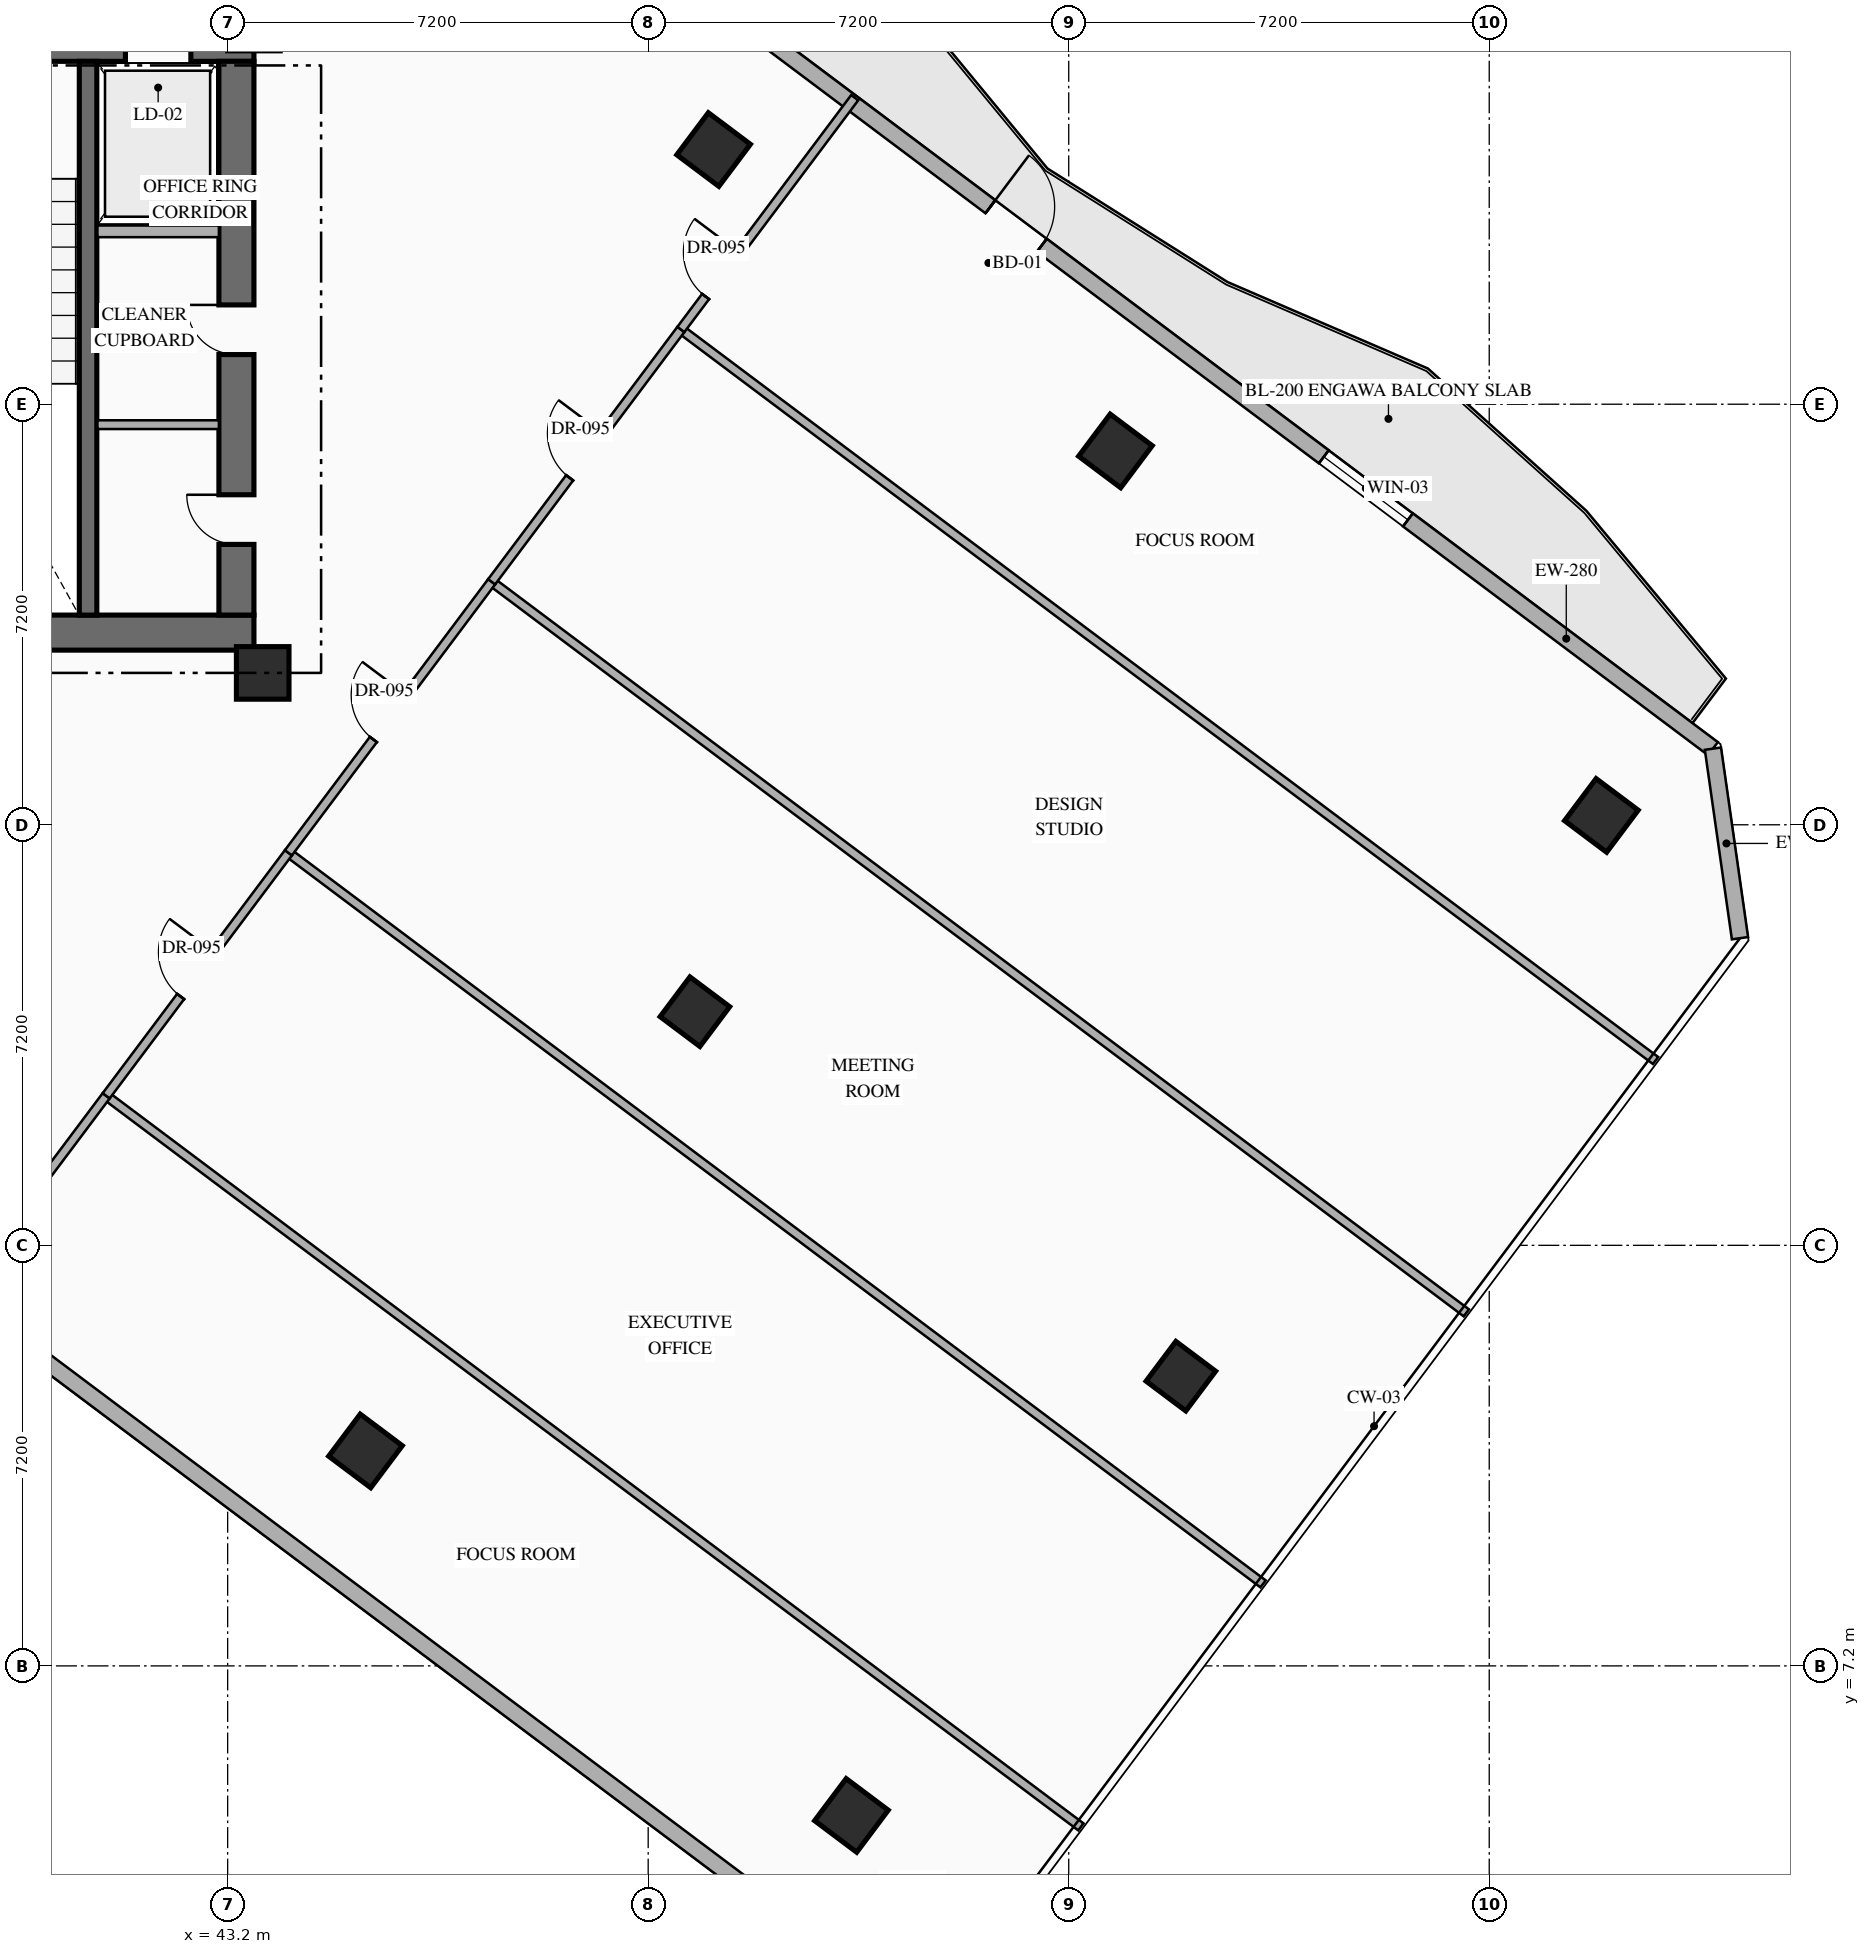
"""IFC4 building model, lengths in metres.
Left out: names, types, materials, properties, quantities, classifications, styles, units other than length and angle.
Written with IfcOpenShell. Run it as: python <this file> out.ifc"""

import sys

from ifc_helpers import new_model, si_unit, direction, frame, frame_2d, origin, origin_2d, place, context, subcontext, project, spatial, rectangle, hollow_rectangle, extrude, element, fill, save


model = new_model("IFC4")
c1 = context("Model", 3, precision=1e-05, world=origin(), true_north=direction((0.0, 1.0)))
c2 = subcontext(c1, "Body", "Model", "MODEL_VIEW")
j1 = project(units=[si_unit("LENGTHUNIT", "METRE"), si_unit("PLANEANGLEUNIT", "RADIAN")], contexts=[c1])
p1 = place(None, origin())
s1 = spatial("IfcSite", under=j1, at=p1, CompositionType="ELEMENT")
p2 = place(p1, origin())
s2 = spatial("IfcBuilding", under=s1, at=p2, CompositionType="ELEMENT")
p3 = place(p2, frame((0.0, 0.0, 112.05)))
s3 = spatial("IfcBuildingStorey", under=s2, at=p3, CompositionType="ELEMENT", Elevation=112.05)
p4 = place(p3, frame((35.89, 24.89, 0.0), z_axis=(0.0, 0.0, 1.0), x_axis=(1.0, 0.0, 0.0)))
e1 = element("IfcWall", 1, at=p4, inside=s3, PredefinedType="SHEAR", context=c2, shape_type="SweptSolid", body=[
    extrude(rectangle(XDim=7.76, YDim=0.6, at=frame_2d((3.88, 0.0))), origin(), (0.0, 0.0, 1.0), 3.6),
])
p5 = place(p3, frame((35.89, 34.97, 0.0), z_axis=(0.0, 0.0, 1.0), x_axis=(1.0, 0.0, 0.0)))
e2 = element("IfcWall", 2, at=p5, inside=s3, PredefinedType="SHEAR", context=c2, shape_type="SweptSolid", body=[
    extrude(rectangle(XDim=7.76, YDim=0.6, at=frame_2d((3.88, 0.0))), origin(), (0.0, 0.0, 1.0), 3.6),
])
p6 = place(p5, frame((2.66, 0.0, 0.0)))
e3 = element("IfcOpeningElement", 3, at=p6, cuts=e2, PredefinedType="OPENING", context=c2, shape_type="SweptSolid", body=[
    extrude(rectangle(XDim=1.1, YDim=2.2, at=frame_2d((0.55, 1.1))), frame((0.0, 0.31, 0.0), z_axis=(0.0, -1.0, 0.0), x_axis=(1.0, 0.0, 0.0)), (0.0, 0.0, 1.0), 0.62),
])
p7 = place(p5, frame((5.56, 0.0, 0.0)))
e4 = element("IfcOpeningElement", 4, at=p7, cuts=e2, PredefinedType="OPENING", context=c2, shape_type="SweptSolid", body=[
    extrude(rectangle(XDim=1.12, YDim=2.15, at=frame_2d((0.56, 1.075))), frame((0.0, 0.31, 0.0), z_axis=(0.0, -1.0, 0.0), x_axis=(1.0, 0.0, 0.0)), (0.0, 0.0, 1.0), 0.62),
])
p8 = place(p3, frame((43.35, 25.19, 0.0), z_axis=(0.0, 0.0, 1.0), x_axis=(0.0, 1.0, 0.0)))
e5 = element("IfcWall", 5, at=p8, inside=s3, PredefinedType="SHEAR", context=c2, shape_type="SweptSolid", body=[
    extrude(rectangle(XDim=9.48, YDim=0.6, at=frame_2d((4.74, 0.0))), origin(), (0.0, 0.0, 1.0), 3.6),
])
p9 = place(p8, frame((1.21, 0.0, 0.0)))
e6 = element("IfcOpeningElement", 6, at=p9, cuts=e5, PredefinedType="OPENING", context=c2, shape_type="SweptSolid", body=[
    extrude(rectangle(XDim=0.85, YDim=2.08, at=frame_2d((0.425, 1.04))), frame((0.0, 0.31, 0.0), z_axis=(0.0, -1.0, 0.0), x_axis=(1.0, 0.0, 0.0)), (0.0, 0.0, 1.0), 0.62),
])
p10 = place(p8, frame((4.46, 0.0, 0.0)))
e7 = element("IfcOpeningElement", 7, at=p10, cuts=e5, PredefinedType="OPENING", context=c2, shape_type="SweptSolid", body=[
    extrude(rectangle(XDim=0.85, YDim=2.08, at=frame_2d((0.425, 1.04))), frame((0.0, 0.31, 0.0), z_axis=(0.0, -1.0, 0.0), x_axis=(1.0, 0.0, 0.0)), (0.0, 0.0, 1.0), 0.62),
])
p11 = place(p3, frame((40.81, 25.19, 0.0), z_axis=(0.0, 0.0, 1.0), x_axis=(0.0, 1.0, 0.0)))
e8 = element("IfcWall", 8, at=p11, inside=s3, PredefinedType="SHEAR", context=c2, shape_type="SweptSolid", body=[
    extrude(rectangle(XDim=9.48, YDim=0.3, at=frame_2d((4.74, 0.0))), origin(), (0.0, 0.0, 1.0), 3.6),
])
p12 = place(p3, frame((43.8, 24.2, 0.0), z_axis=(0.0, 0.0, 1.0), x_axis=(1.0, 0.0, 0.0)))
e9 = element("IfcColumn", 9, at=p12, inside=s3, PredefinedType="COLUMN", context=c2, shape_type="SweptSolid", body=[
    extrude(rectangle(XDim=0.9, YDim=0.9, at=origin_2d()), origin(), (0.0, 0.0, 1.0), 3.6),
])
for number, where, z_axis, x_axis in (
    (10, (51.52, 33.16, 0.0), (0.0, 0.0, 1.0), (0.8, -0.6, 0.0)),
    (11, (45.56, 10.88, 0.0), (0.0, 0.0, 1.0), (0.8, -0.6, 0.0)),
    (12, (58.4, 28.0, 0.0), (0.0, 0.0, 1.0), (0.8, -0.6, 0.0)),
):
    element("IfcColumn", number, at=place(p3, frame(where, z_axis=z_axis, x_axis=x_axis)), inside=s3, PredefinedType="COLUMN", context=c2, shape_type="SweptSolid", body=[
        extrude(hollow_rectangle(XDim=0.9, YDim=0.9, WallThickness=0.036, at=origin_2d()), origin(), (0.0, 0.0, 1.0), 3.6),
    ])
p13 = place(p3, frame((51.2, 18.4, 0.0), z_axis=(0.0, 0.0, 1.0), x_axis=(0.799999996291, -0.600000004945, 0.0)))
e13 = element("IfcColumn", 13, at=p13, inside=s3, PredefinedType="COLUMN", context=c2, shape_type="SweptSolid", body=[
    extrude(hollow_rectangle(XDim=0.85, YDim=0.85, WallThickness=0.032, at=origin_2d()), origin(), (0.0, 0.0, 1.0), 3.6),
])
for number, where, z_axis, x_axis in (
    (14, (53.88, 4.64, 0.0), (0.0, 0.0, 1.0), (0.8, -0.6, 0.0)),
    (15, (66.72, 21.76, 0.0), (0.0, 0.0, 1.0), (0.8, -0.6, 0.0)),
):
    element("IfcColumn", number, at=place(p3, frame(where, z_axis=z_axis, x_axis=x_axis)), inside=s3, PredefinedType="COLUMN", context=c2, shape_type="SweptSolid", body=[
        extrude(hollow_rectangle(XDim=0.9, YDim=0.9, WallThickness=0.036, at=origin_2d()), origin(), (0.0, 0.0, 1.0), 3.6),
    ])
p14 = place(p3, frame((59.52, 12.16, 0.0), z_axis=(0.0, 0.0, 1.0), x_axis=(0.799999996291, -0.600000004945, 0.0)))
e16 = element("IfcColumn", 16, at=p14, inside=s3, PredefinedType="COLUMN", context=c2, shape_type="SweptSolid", body=[
    extrude(hollow_rectangle(XDim=0.85, YDim=0.85, WallThickness=0.032, at=origin_2d()), origin(), (0.0, 0.0, 1.0), 3.6),
])
p15 = place(p3, frame((44.86, 40.73, 0.0), z_axis=(0.0, 0.0, 1.0), x_axis=(0.800006902154, -0.599990797017, 0.0)))
e17 = element("IfcWall", 17, at=p15, inside=s3, PredefinedType="STANDARD", context=c2, shape_type="SweptSolid", body=[
    extrude(rectangle(XDim=29.712, YDim=0.28, at=frame_2d((14.856, 0.0))), origin(), (0.0, 0.0, 1.0), 3.35),
])
p16 = place(p15, frame((14.249, 0.0, 0.0)))
e18 = element("IfcOpeningElement", 18, at=p16, cuts=e17, PredefinedType="OPENING", context=c2, shape_type="SweptSolid", body=[
    extrude(rectangle(XDim=1.1, YDim=2.2, at=frame_2d((0.55, 1.1))), frame((0.0, 0.15, 0.0), z_axis=(0.0, -1.0, 0.0), x_axis=(1.0, 0.0, 0.0)), (0.0, 0.0, 1.0), 0.3),
])
p17 = place(p15, frame((6.528, 0.0, 0.85)))
e19 = element("IfcOpeningElement", 19, at=p17, cuts=e17, PredefinedType="OPENING", context=c2, shape_type="SweptSolid", body=[
    extrude(rectangle(XDim=1.8, YDim=2.1, at=frame_2d((0.9, 1.05))), frame((0.0, 0.15, 0.0), z_axis=(0.0, -1.0, 0.0), x_axis=(1.0, 0.0, 0.0)), (0.0, 0.0, 1.0), 0.3),
])
p18 = place(p15, frame((21.384, 0.0, 0.85)))
e20 = element("IfcOpeningElement", 20, at=p18, cuts=e17, PredefinedType="OPENING", context=c2, shape_type="SweptSolid", body=[
    extrude(rectangle(XDim=1.8, YDim=2.1, at=frame_2d((0.9, 1.05))), frame((0.0, 0.15, 0.0), z_axis=(0.0, -1.0, 0.0), x_axis=(1.0, 0.0, 0.0)), (0.0, 0.0, 1.0), 0.3),
])
p19 = place(p3, frame((68.63, 22.903, 0.0), z_axis=(0.0, 0.0, 1.0), x_axis=(0.141285803956, -0.989968848803, 0.0)))
e21 = element("IfcWall", 21, at=p19, inside=s3, PredefinedType="STANDARD", context=c2, shape_type="SweptSolid", body=[
    extrude(rectangle(XDim=3.278, YDim=0.28, at=frame_2d((1.639, 0.0))), origin(), (0.0, 0.0, 1.0), 3.35),
])
p20 = place(p3, frame((53.318, 2.487, 0.0), z_axis=(0.0, 0.0, 1.0), x_axis=(-0.800004174678, 0.599994433723, 0.0)))
e22 = element("IfcWall", 22, at=p20, inside=s3, PredefinedType="STANDARD", context=c2, shape_type="SweptSolid", body=[
    extrude(rectangle(XDim=35.089, YDim=0.28, at=frame_2d((17.544, 0.0))), origin(), (0.0, 0.0, 1.0), 3.35),
])
p21 = place(p3, frame((40.97, 31.76, 0.0), z_axis=(0.0, 0.0, 1.0), x_axis=(1.0, 0.0, 0.0)))
e23 = element("IfcWall", 23, at=p21, inside=s3, PredefinedType="STANDARD", context=c2, shape_type="SweptSolid", body=[
    extrude(rectangle(XDim=2.08, YDim=0.2, at=frame_2d((1.04, 0.0))), origin(), (0.0, 0.0, 1.0), 3.35),
])
p22 = place(p3, frame((40.97, 28.45, 0.0), z_axis=(0.0, 0.0, 1.0), x_axis=(1.0, 0.0, 0.0)))
e24 = element("IfcWall", 24, at=p22, inside=s3, PredefinedType="PARTITIONING", context=c2, shape_type="SweptSolid", body=[
    extrude(rectangle(XDim=2.08, YDim=0.15, at=frame_2d((1.04, 0.0))), origin(), (0.0, 0.0, 1.0), 3.35),
])
p23 = place(p3, frame((41.12, 16.96, 0.0), z_axis=(0.0, 0.0, 1.0), x_axis=(0.800002808908, -0.599996254772, 0.0)))
e25 = element("IfcWall", 25, at=p23, inside=s3, PredefinedType="PARTITIONING", context=c2, shape_type="SweptSolid", body=[
    extrude(rectangle(XDim=20.86, YDim=0.15, at=frame_2d((10.43, 0.0))), origin(), (0.0, 0.0, 1.0), 3.35),
])
p24 = place(p3, frame((38.504, 13.472, 0.0), z_axis=(0.0, 0.0, 1.0), x_axis=(0.600026876565, 0.799979841871, 0.0)))
e26 = element("IfcWall", 26, at=p24, inside=s3, PredefinedType="PARTITIONING", context=c2, shape_type="SweptSolid", body=[
    extrude(rectangle(XDim=4.36, YDim=0.15, at=frame_2d((2.18, 0.0))), origin(), (0.0, 0.0, 1.0), 3.35),
])
p25 = place(p24, frame((0.38, 0.0, 0.0)))
e27 = element("IfcOpeningElement", 27, at=p25, cuts=e26, PredefinedType="OPENING", context=c2, shape_type="SweptSolid", body=[
    extrude(rectangle(XDim=0.95, YDim=2.15, at=frame_2d((0.475, 1.075))), frame((0.0, 0.085, 0.0), z_axis=(0.0, -1.0, 0.0), x_axis=(1.0, 0.0, 0.0)), (0.0, 0.0, 1.0), 0.17),
])
p26 = place(p3, frame((44.24, 21.12, 0.0), z_axis=(0.0, 0.0, 1.0), x_axis=(0.799997191095, -0.600003745189, 0.0)))
e28 = element("IfcWall", 28, at=p26, inside=s3, PredefinedType="PARTITIONING", context=c2, shape_type="SweptSolid", body=[
    extrude(rectangle(XDim=20.86, YDim=0.15, at=frame_2d((10.43, 0.0))), origin(), (0.0, 0.0, 1.0), 2.995),
])
p27 = place(p3, frame((41.12, 16.96, 0.0), z_axis=(0.0, 0.0, 1.0), x_axis=(0.599969951782, 0.800022535282, 0.0)))
e29 = element("IfcWall", 29, at=p27, inside=s3, PredefinedType="PARTITIONING", context=c2, shape_type="SweptSolid", body=[
    extrude(rectangle(XDim=5.2, YDim=0.15, at=frame_2d((2.6, 0.0))), origin(), (0.0, 0.0, 1.0), 3.35),
])
p28 = place(p27, frame((2.125, 0.0, 0.0)))
e30 = element("IfcOpeningElement", 30, at=p28, cuts=e29, PredefinedType="OPENING", context=c2, shape_type="SweptSolid", body=[
    extrude(rectangle(XDim=0.95, YDim=2.15, at=frame_2d((0.475, 1.075))), frame((0.0, 0.085, 0.0), z_axis=(0.0, -1.0, 0.0), x_axis=(1.0, 0.0, 0.0)), (0.0, 0.0, 1.0), 0.17),
])
p29 = place(p3, frame((47.72, 25.76, 0.0), z_axis=(0.0, 0.0, 1.0), x_axis=(0.799997191095, -0.600003745189, 0.0)))
e31 = element("IfcWall", 31, at=p29, inside=s3, PredefinedType="PARTITIONING", context=c2, shape_type="SweptSolid", body=[
    extrude(rectangle(XDim=20.86, YDim=0.15, at=frame_2d((10.43, 0.0))), origin(), (0.0, 0.0, 1.0), 3.35),
])
p30 = place(p3, frame((44.24, 21.12, 0.0), z_axis=(0.0, 0.0, 1.0), x_axis=(0.600006735006, 0.799994948701, 0.0)))
e32 = element("IfcWall", 32, at=p30, inside=s3, PredefinedType="PARTITIONING", context=c2, shape_type="SweptSolid", body=[
    extrude(rectangle(XDim=5.8, YDim=0.15, at=frame_2d((2.9, 0.0))), origin(), (0.0, 0.0, 1.0), 3.35),
])
p31 = place(p30, frame((2.425, 0.0, 0.0)))
e33 = element("IfcOpeningElement", 33, at=p31, cuts=e32, PredefinedType="OPENING", context=c2, shape_type="SweptSolid", body=[
    extrude(rectangle(XDim=0.95, YDim=2.15, at=frame_2d((0.475, 1.075))), frame((0.0, 0.085, 0.0), z_axis=(0.0, -1.0, 0.0), x_axis=(1.0, 0.0, 0.0)), (0.0, 0.0, 1.0), 0.17),
])
p32 = place(p3, frame((50.96, 30.08, 0.0), z_axis=(0.0, 0.0, 1.0), x_axis=(0.799997191095, -0.600003745189, 0.0)))
e34 = element("IfcWall", 34, at=p32, inside=s3, PredefinedType="PARTITIONING", context=c2, shape_type="SweptSolid", body=[
    extrude(rectangle(XDim=20.86, YDim=0.15, at=frame_2d((10.43, 0.0))), origin(), (0.0, 0.0, 1.0), 3.35),
])
p33 = place(p3, frame((47.72, 25.76, 0.0), z_axis=(0.0, 0.0, 1.0), x_axis=(0.599992766245, 0.800005425265, 0.0)))
e35 = element("IfcWall", 35, at=p33, inside=s3, PredefinedType="PARTITIONING", context=c2, shape_type="SweptSolid", body=[
    extrude(rectangle(XDim=5.4, YDim=0.15, at=frame_2d((2.7, 0.0))), origin(), (0.0, 0.0, 1.0), 3.35),
])
p34 = place(p33, frame((2.225, 0.0, 0.0)))
e36 = element("IfcOpeningElement", 36, at=p34, cuts=e35, PredefinedType="OPENING", context=c2, shape_type="SweptSolid", body=[
    extrude(rectangle(XDim=0.95, YDim=2.15, at=frame_2d((0.475, 1.075))), frame((0.0, 0.085, 0.0), z_axis=(0.0, -1.0, 0.0), x_axis=(1.0, 0.0, 0.0)), (0.0, 0.0, 1.0), 0.17),
])
p35 = place(p3, frame((50.96, 30.08, 0.0), z_axis=(0.0, 0.0, 1.0), x_axis=(0.600007875382, 0.799994093403, 0.0)))
e37 = element("IfcWall", 37, at=p35, inside=s3, PredefinedType="PARTITIONING", context=c2, shape_type="SweptSolid", body=[
    extrude(rectangle(XDim=4.96, YDim=0.15, at=frame_2d((2.48, 0.0))), origin(), (0.0, 0.0, 1.0), 3.35),
])
p36 = place(p35, frame((0.705, 0.0, 0.0)))
e38 = element("IfcOpeningElement", 38, at=p36, cuts=e37, PredefinedType="OPENING", context=c2, shape_type="SweptSolid", body=[
    extrude(rectangle(XDim=0.95, YDim=2.15, at=frame_2d((0.475, 1.075))), frame((0.0, 0.085, 0.0), z_axis=(0.0, -1.0, 0.0), x_axis=(1.0, 0.0, 0.0)), (0.0, 0.0, 1.0), 0.17),
])
p37 = place(p16, origin())
e39 = element("IfcDoor", 39, at=p37, inside=s3, OperationType="SINGLE_SWING_LEFT", PredefinedType="DOOR", context=c2, shape_type="SweptSolid", body=[
    extrude(rectangle(XDim=1.1, YDim=2.2, at=frame_2d((0.55, 1.1))), frame((0.0, 0.025, 0.0), z_axis=(0.0, -1.0, 0.0), x_axis=(1.0, 0.0, 0.0)), (0.0, 0.0, 1.0), 0.05),
])
fill(e18, e39)
p38 = place(p18, origin())
e40 = element("IfcWindow", 40, at=p38, inside=s3, PartitioningType="SINGLE_PANEL", PredefinedType="WINDOW", context=c2, shape_type="SweptSolid", body=[
    extrude(rectangle(XDim=1.8, YDim=2.1, at=frame_2d((0.9, 1.05))), frame((0.0, 0.03, 0.0), z_axis=(0.0, -1.0, 0.0), x_axis=(1.0, 0.0, 0.0)), (0.0, 0.0, 1.0), 0.06),
])
fill(e20, e40)
p39 = place(p9, origin())
e41 = element("IfcDoor", 41, at=p39, inside=s3, OperationType="SINGLE_SWING_RIGHT", PredefinedType="DOOR", context=c2, shape_type="SweptSolid", body=[
    extrude(rectangle(XDim=0.85, YDim=2.08, at=frame_2d((0.425, 1.04))), frame((0.0, 0.025, 0.0), z_axis=(0.0, -1.0, 0.0), x_axis=(1.0, 0.0, 0.0)), (0.0, 0.0, 1.0), 0.05),
])
fill(e6, e41)
p40 = place(p10, origin())
e42 = element("IfcDoor", 42, at=p40, inside=s3, OperationType="SINGLE_SWING_RIGHT", PredefinedType="DOOR", context=c2, shape_type="SweptSolid", body=[
    extrude(rectangle(XDim=0.85, YDim=2.08, at=frame_2d((0.425, 1.04))), frame((0.0, 0.025, 0.0), z_axis=(0.0, -1.0, 0.0), x_axis=(1.0, 0.0, 0.0)), (0.0, 0.0, 1.0), 0.05),
])
fill(e7, e42)
p41 = place(p28, origin())
e43 = element("IfcDoor", 43, at=p41, inside=s3, OperationType="SINGLE_SWING_RIGHT", PredefinedType="DOOR", context=c2, shape_type="SweptSolid", body=[
    extrude(rectangle(XDim=0.95, YDim=2.15, at=frame_2d((0.475, 1.075))), frame((0.0, 0.025, 0.0), z_axis=(0.0, -1.0, 0.0), x_axis=(1.0, 0.0, 0.0)), (0.0, 0.0, 1.0), 0.05),
])
fill(e30, e43)
p42 = place(p31, origin())
e44 = element("IfcDoor", 44, at=p42, inside=s3, OperationType="SINGLE_SWING_RIGHT", PredefinedType="DOOR", context=c2, shape_type="SweptSolid", body=[
    extrude(rectangle(XDim=0.95, YDim=2.15, at=frame_2d((0.475, 1.075))), frame((0.0, 0.025, 0.0), z_axis=(0.0, -1.0, 0.0), x_axis=(1.0, 0.0, 0.0)), (0.0, 0.0, 1.0), 0.05),
])
fill(e33, e44)
p43 = place(p34, origin())
e45 = element("IfcDoor", 45, at=p43, inside=s3, OperationType="SINGLE_SWING_RIGHT", PredefinedType="DOOR", context=c2, shape_type="SweptSolid", body=[
    extrude(rectangle(XDim=0.95, YDim=2.15, at=frame_2d((0.475, 1.075))), frame((0.0, 0.025, 0.0), z_axis=(0.0, -1.0, 0.0), x_axis=(1.0, 0.0, 0.0)), (0.0, 0.0, 1.0), 0.05),
])
fill(e36, e45)
p44 = place(p36, origin())
e46 = element("IfcDoor", 46, at=p44, inside=s3, OperationType="SINGLE_SWING_RIGHT", PredefinedType="DOOR", context=c2, shape_type="SweptSolid", body=[
    extrude(rectangle(XDim=0.95, YDim=2.15, at=frame_2d((0.475, 1.075))), frame((0.0, 0.025, 0.0), z_axis=(0.0, -1.0, 0.0), x_axis=(1.0, 0.0, 0.0)), (0.0, 0.0, 1.0), 0.05),
])
fill(e38, e46)
save(model, sys.argv[1])
